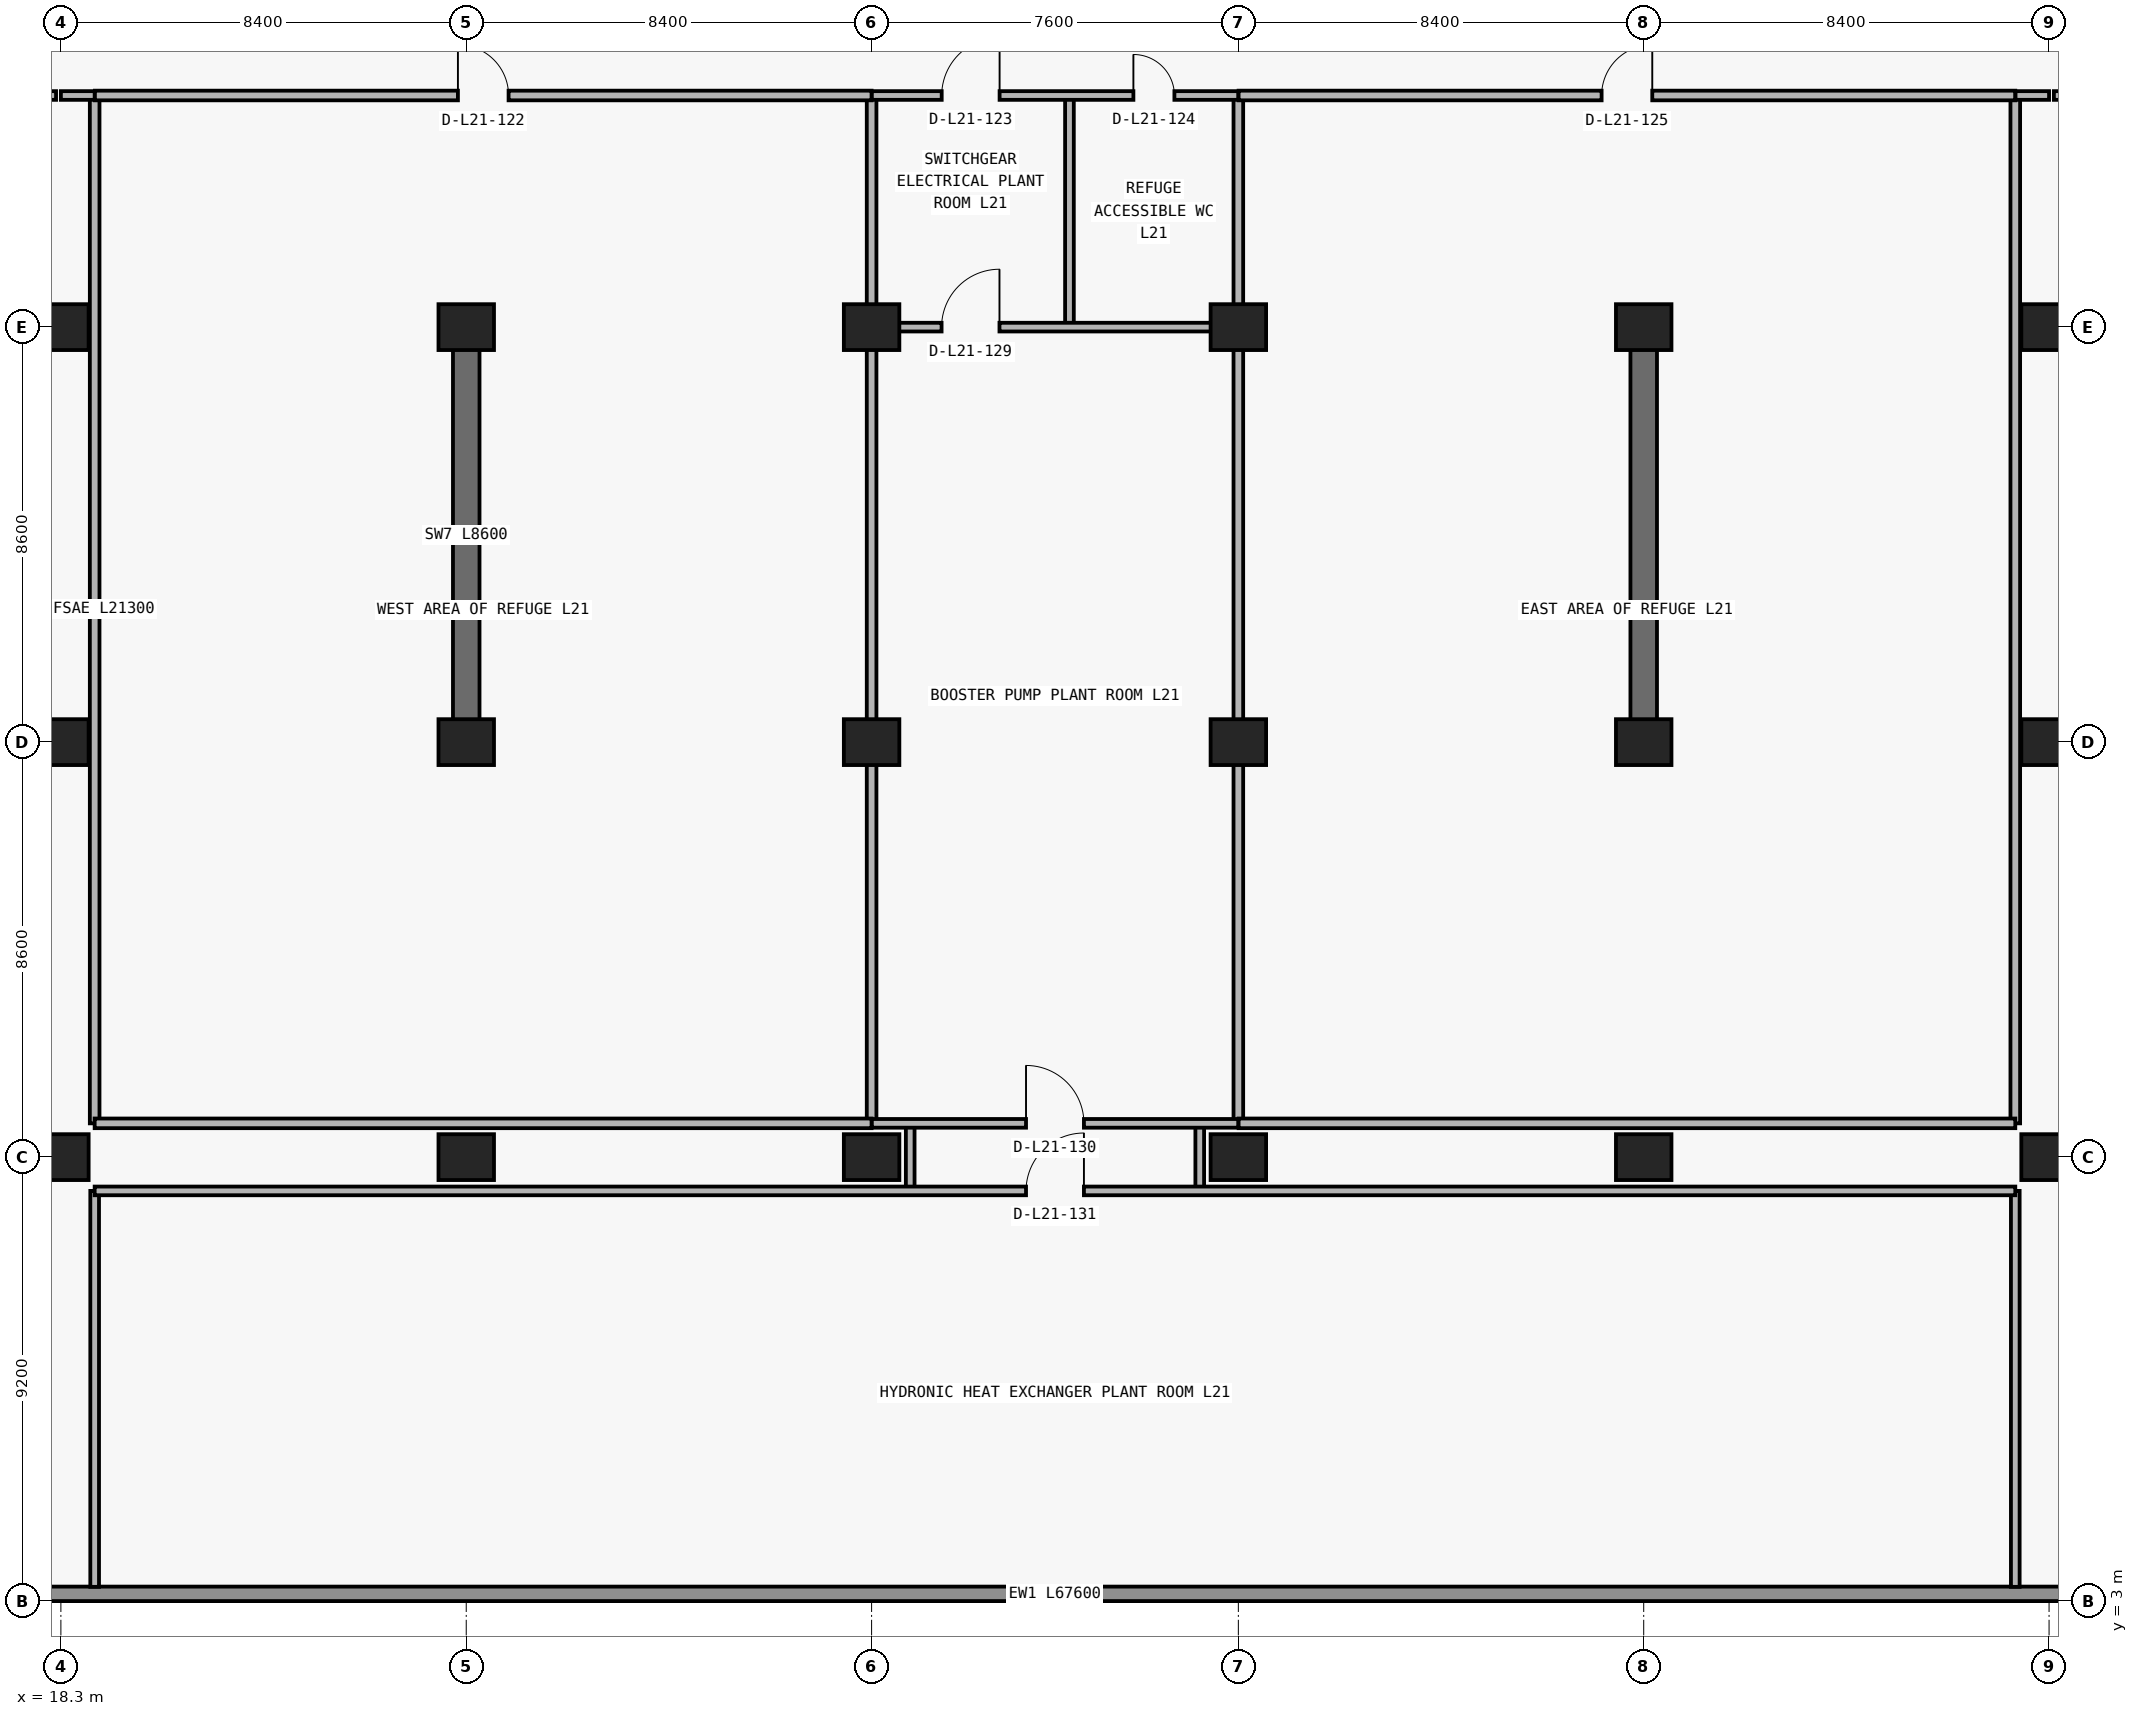
"""IFC4 building model, lengths in metres.
Left out: names, types, materials, properties, quantities, classifications, styles, units other than length and angle.
Written with IfcOpenShell. Run it as: python <this file> out.ifc"""

import sys

from ifc_helpers import new_model, si_unit, direction, frame, frame_2d, origin, origin_2d, place, context, subcontext, project, spatial, rectangle, extrude, element, fill, save


model = new_model("IFC4")
c1 = context("Model", 3, precision=1e-05, world=origin(), true_north=direction((0.0, 1.0)))
c2 = subcontext(c1, "Body", "Model", "MODEL_VIEW")
j1 = project(units=[si_unit("LENGTHUNIT", "METRE"), si_unit("PLANEANGLEUNIT", "RADIAN")], contexts=[c1])
p1 = place(None, origin())
s1 = spatial("IfcSite", under=j1, at=p1, CompositionType="ELEMENT")
p2 = place(p1, origin())
s2 = spatial("IfcBuilding", under=s1, at=p2, CompositionType="ELEMENT")
p3 = place(p2, frame((0.0, 0.0, 79.5)))
s3 = spatial("IfcBuildingStorey", under=s2, at=p3, CompositionType="ELEMENT", Elevation=79.5)
for number, where, z_axis, x_axis in (
    (1, (18.3, 12.2, 0.0), (0.0, 0.0, 1.0), (1.0, 0.0, 0.0)),
    (2, (26.7, 12.2, 0.0), (0.0, 0.0, 1.0), (1.0, 0.0, 0.0)),
    (3, (35.1, 12.2, 0.0), (0.0, 0.0, 1.0), (1.0, 0.0, 0.0)),
    (4, (42.7, 12.2, 0.0), (0.0, 0.0, 1.0), (1.0, 0.0, 0.0)),
    (5, (51.1, 12.2, 0.0), (0.0, 0.0, 1.0), (1.0, 0.0, 0.0)),
    (6, (59.5, 12.2, 0.0), (0.0, 0.0, 1.0), (1.0, 0.0, 0.0)),
    (7, (18.3, 20.8, 0.0), (0.0, 0.0, 1.0), (1.0, 0.0, 0.0)),
    (8, (26.7, 20.8, 0.0), (0.0, 0.0, 1.0), (1.0, 0.0, 0.0)),
    (9, (35.1, 20.8, 0.0), (0.0, 0.0, 1.0), (1.0, 0.0, 0.0)),
    (10, (42.7, 20.8, 0.0), (0.0, 0.0, 1.0), (1.0, 0.0, 0.0)),
    (11, (51.1, 20.8, 0.0), (0.0, 0.0, 1.0), (1.0, 0.0, 0.0)),
    (12, (59.5, 20.8, 0.0), (0.0, 0.0, 1.0), (1.0, 0.0, 0.0)),
    (13, (18.3, 29.4, 0.0), (0.0, 0.0, 1.0), (1.0, 0.0, 0.0)),
    (14, (26.7, 29.4, 0.0), (0.0, 0.0, 1.0), (1.0, 0.0, 0.0)),
    (15, (35.1, 29.4, 0.0), (0.0, 0.0, 1.0), (1.0, 0.0, 0.0)),
    (16, (42.7, 29.4, 0.0), (0.0, 0.0, 1.0), (1.0, 0.0, 0.0)),
    (17, (51.1, 29.4, 0.0), (0.0, 0.0, 1.0), (1.0, 0.0, 0.0)),
    (18, (59.5, 29.4, 0.0), (0.0, 0.0, 1.0), (1.0, 0.0, 0.0)),
):
    element("IfcColumn", number, at=place(p3, frame(where, z_axis=z_axis, x_axis=x_axis)), inside=s3, PredefinedType="COLUMN", context=c2, shape_type="SweptSolid", body=[
        extrude(rectangle(XDim=1.15, YDim=0.95, at=origin_2d()), origin(), (0.0, 0.0, 1.0), 4.85),
    ])
for number, where, z_axis, x_axis in (
    (19, (26.7, 20.8, 0.0), (0.0, 0.0, 1.0), (0.0, 1.0, 0.0)),
    (20, (51.1, 20.8, 0.0), (0.0, 0.0, 1.0), (0.0, 1.0, 0.0)),
):
    element("IfcWall", number, at=place(p3, frame(where, z_axis=z_axis, x_axis=x_axis)), inside=s3, PredefinedType="SHEAR", context=c2, shape_type="SweptSolid", body=[
        extrude(rectangle(XDim=8.6, YDim=0.55, at=frame_2d((4.3, 0.0))), origin(), (0.0, 0.0, 1.0), 4.85),
    ])
p4 = place(p3, frame((72.7, 3.15, 0.0), z_axis=(0.0, 0.0, 1.0), x_axis=(-1.0, 0.0, 0.0)))
e21 = element("IfcWall", 21, at=p4, inside=s3, PredefinedType="STANDARD", context=c2, shape_type="SweptSolid", body=[
    extrude(rectangle(XDim=67.6, YDim=0.3, at=frame_2d((33.8, 0.0))), origin(), (0.0, 0.0, 1.0), 4.85),
])
p5 = place(p3, frame((19.0, 3.295, 0.0), z_axis=(0.0, 0.0, 1.0), x_axis=(0.0, 1.0, 0.0)))
e22 = element("IfcWall", 22, at=p5, inside=s3, PredefinedType="PARTITIONING", context=c2, shape_type="SweptSolid", body=[
    extrude(rectangle(XDim=8.205, YDim=0.18, at=frame_2d((4.103, 0.0))), origin(), (0.0, 0.0, 1.0), 4.85),
])
p6 = place(p3, frame((19.0, 12.9, 0.0), z_axis=(0.0, 0.0, 1.0), x_axis=(0.0, 1.0, 0.0)))
e23 = element("IfcWall", 23, at=p6, inside=s3, PredefinedType="PARTITIONING", context=c2, shape_type="SweptSolid", body=[
    extrude(rectangle(XDim=21.3, YDim=0.2, at=frame_2d((10.65, 0.0))), origin(), (0.0, 0.0, 1.0), 4.85),
])
p7 = place(p3, frame((35.1, 12.9, 0.0), z_axis=(0.0, 0.0, 1.0), x_axis=(0.0, 1.0, 0.0)))
e24 = element("IfcWall", 24, at=p7, inside=s3, PredefinedType="PARTITIONING", context=c2, shape_type="SweptSolid", body=[
    extrude(rectangle(XDim=21.3, YDim=0.2, at=frame_2d((10.65, 0.0))), origin(), (0.0, 0.0, 1.0), 3.814),
])
p8 = place(p3, frame((35.9, 11.5, 0.0), z_axis=(0.0, 0.0, 1.0), x_axis=(0.0, 1.0, 0.0)))
e25 = element("IfcWall", 25, at=p8, inside=s3, PredefinedType="PARTITIONING", context=c2, shape_type="SweptSolid", body=[
    extrude(rectangle(XDim=1.4, YDim=0.18, at=frame_2d((0.7, 0.0))), origin(), (0.0, 0.0, 1.0), 4.85),
])
p9 = place(p3, frame((39.2, 29.4, 0.0), z_axis=(0.0, 0.0, 1.0), x_axis=(0.0, 1.0, 0.0)))
e26 = element("IfcWall", 26, at=p9, inside=s3, PredefinedType="PARTITIONING", context=c2, shape_type="SweptSolid", body=[
    extrude(rectangle(XDim=4.8, YDim=0.18, at=frame_2d((2.4, 0.0))), origin(), (0.0, 0.0, 1.0), 4.85),
])
p10 = place(p3, frame((41.9, 11.5, 0.0), z_axis=(0.0, 0.0, 1.0), x_axis=(0.0, 1.0, 0.0)))
e27 = element("IfcWall", 27, at=p10, inside=s3, PredefinedType="PARTITIONING", context=c2, shape_type="SweptSolid", body=[
    extrude(rectangle(XDim=1.4, YDim=0.18, at=frame_2d((0.7, 0.0))), origin(), (0.0, 0.0, 1.0), 4.85),
])
p11 = place(p3, frame((42.7, 12.9, 0.0), z_axis=(0.0, 0.0, 1.0), x_axis=(0.0, 1.0, 0.0)))
e28 = element("IfcWall", 28, at=p11, inside=s3, PredefinedType="PARTITIONING", context=c2, shape_type="SweptSolid", body=[
    extrude(rectangle(XDim=21.3, YDim=0.2, at=frame_2d((10.65, 0.0))), origin(), (0.0, 0.0, 1.0), 3.814),
])
p12 = place(p3, frame((58.8, 3.295, 0.0), z_axis=(0.0, 0.0, 1.0), x_axis=(0.0, 1.0, 0.0)))
e29 = element("IfcWall", 29, at=p12, inside=s3, PredefinedType="PARTITIONING", context=c2, shape_type="SweptSolid", body=[
    extrude(rectangle(XDim=8.205, YDim=0.18, at=frame_2d((4.103, 0.0))), origin(), (0.0, 0.0, 1.0), 4.85),
])
p13 = place(p3, frame((58.8, 12.9, 0.0), z_axis=(0.0, 0.0, 1.0), x_axis=(0.0, 1.0, 0.0)))
e30 = element("IfcWall", 30, at=p13, inside=s3, PredefinedType="PARTITIONING", context=c2, shape_type="SweptSolid", body=[
    extrude(rectangle(XDim=21.3, YDim=0.2, at=frame_2d((10.65, 0.0))), origin(), (0.0, 0.0, 1.0), 4.85),
])
p14 = place(p3, frame((19.0, 11.5, 0.0), z_axis=(0.0, 0.0, 1.0), x_axis=(1.0, 0.0, 0.0)))
e31 = element("IfcWall", 31, at=p14, inside=s3, PredefinedType="PARTITIONING", context=c2, shape_type="SweptSolid", body=[
    extrude(rectangle(XDim=39.8, YDim=0.18, at=frame_2d((19.9, 0.0))), origin(), (0.0, 0.0, 1.0), 4.85),
])
p15 = place(p14, frame((19.3, 0.0, 0.0)))
e32 = element("IfcOpeningElement", 32, at=p15, cuts=e31, PredefinedType="OPENING", context=c2, shape_type="SweptSolid", body=[
    extrude(rectangle(XDim=1.2, YDim=2.2, at=frame_2d((0.6, 1.1))), frame((0.0, 0.1, 0.0), z_axis=(0.0, -1.0, 0.0), x_axis=(1.0, 0.0, 0.0)), (0.0, 0.0, 1.0), 0.2),
])
p16 = place(p3, frame((19.0, 12.9, 0.0), z_axis=(0.0, 0.0, 1.0), x_axis=(1.0, 0.0, 0.0)))
e33 = element("IfcWall", 33, at=p16, inside=s3, PredefinedType="PARTITIONING", context=c2, shape_type="SweptSolid", body=[
    extrude(rectangle(XDim=16.1, YDim=0.2, at=frame_2d((8.05, 0.0))), origin(), (0.0, 0.0, 1.0), 4.85),
])
p17 = place(p3, frame((35.105, 12.9, 0.0), z_axis=(0.0, 0.0, 1.0), x_axis=(1.0, 0.0, 0.0)))
e34 = element("IfcWall", 34, at=p17, inside=s3, PredefinedType="PARTITIONING", context=c2, shape_type="SweptSolid", body=[
    extrude(rectangle(XDim=7.595, YDim=0.18, at=frame_2d((3.797, 0.0))), origin(), (0.0, 0.0, 1.0), 4.85),
])
p18 = place(p17, frame((3.195, 0.0, 0.0)))
e35 = element("IfcOpeningElement", 35, at=p18, cuts=e34, PredefinedType="OPENING", context=c2, shape_type="SweptSolid", body=[
    extrude(rectangle(XDim=1.2, YDim=2.2, at=frame_2d((0.6, 1.1))), frame((0.0, 0.1, 0.0), z_axis=(0.0, -1.0, 0.0), x_axis=(1.0, 0.0, 0.0)), (0.0, 0.0, 1.0), 0.2),
])
p19 = place(p3, frame((42.705, 12.9, 0.0), z_axis=(0.0, 0.0, 1.0), x_axis=(1.0, 0.0, 0.0)))
e36 = element("IfcWall", 36, at=p19, inside=s3, PredefinedType="PARTITIONING", context=c2, shape_type="SweptSolid", body=[
    extrude(rectangle(XDim=16.095, YDim=0.2, at=frame_2d((8.047, 0.0))), origin(), (0.0, 0.0, 1.0), 4.85),
])
p20 = place(p3, frame((35.1, 29.4, 0.0), z_axis=(0.0, 0.0, 1.0), x_axis=(1.0, 0.0, 0.0)))
e37 = element("IfcWall", 37, at=p20, inside=s3, PredefinedType="PARTITIONING", context=c2, shape_type="SweptSolid", body=[
    extrude(rectangle(XDim=7.6, YDim=0.18, at=frame_2d((3.8, 0.0))), origin(), (0.0, 0.0, 1.0), 3.814),
])
p21 = place(p20, frame((1.45, 0.0, 0.0)))
e38 = element("IfcOpeningElement", 38, at=p21, cuts=e37, PredefinedType="OPENING", context=c2, shape_type="SweptSolid", body=[
    extrude(rectangle(XDim=1.2, YDim=2.2, at=frame_2d((0.6, 1.1))), frame((0.0, 0.1, 0.0), z_axis=(0.0, -1.0, 0.0), x_axis=(1.0, 0.0, 0.0)), (0.0, 0.0, 1.0), 0.2),
])
p22 = place(p3, frame((5.1, 34.2, 0.0), z_axis=(0.0, 0.0, 1.0), x_axis=(1.0, 0.0, 0.0)))
e39 = element("IfcWall", 39, at=p22, inside=s3, PredefinedType="PARTITIONING", context=c2, shape_type="SweptSolid", body=[
    extrude(rectangle(XDim=13.1, YDim=0.18, at=frame_2d((6.55, 0.0))), origin(), (0.0, 0.0, 1.0), 4.85),
])
p23 = place(p22, frame((5.65, 0.0, 0.0)))
e40 = element("IfcOpeningElement", 40, at=p23, cuts=e39, PredefinedType="OPENING", context=c2, shape_type="SweptSolid", body=[
    extrude(rectangle(XDim=1.2, YDim=2.2, at=frame_2d((0.6, 1.1))), frame((0.0, 0.1, 0.0), z_axis=(0.0, -1.0, 0.0), x_axis=(1.0, 0.0, 0.0)), (0.0, 0.0, 1.0), 0.2),
])
p24 = place(p3, frame((18.3, 34.2, 0.0), z_axis=(0.0, 0.0, 1.0), x_axis=(1.0, 0.0, 0.0)))
e41 = element("IfcWall", 41, at=p24, inside=s3, PredefinedType="PARTITIONING", context=c2, shape_type="SweptSolid", body=[
    extrude(rectangle(XDim=0.7, YDim=0.18, at=frame_2d((0.35, 0.0))), origin(), (0.0, 0.0, 1.0), 4.85),
])
p25 = place(p3, frame((19.005, 34.2, 0.0), z_axis=(0.0, 0.0, 1.0), x_axis=(1.0, 0.0, 0.0)))
e42 = element("IfcWall", 42, at=p25, inside=s3, PredefinedType="PARTITIONING", context=c2, shape_type="SweptSolid", body=[
    extrude(rectangle(XDim=16.095, YDim=0.2, at=frame_2d((8.048, 0.0))), origin(), (0.0, 0.0, 1.0), 4.85),
])
p26 = place(p25, frame((7.522, 0.0, 0.0)))
e43 = element("IfcOpeningElement", 43, at=p26, cuts=e42, PredefinedType="OPENING", context=c2, shape_type="SweptSolid", body=[
    extrude(rectangle(XDim=1.05, YDim=2.15, at=frame_2d((0.525, 1.075))), frame((0.0, 0.11, 0.0), z_axis=(0.0, -1.0, 0.0), x_axis=(1.0, 0.0, 0.0)), (0.0, 0.0, 1.0), 0.22),
])
p27 = place(p3, frame((35.105, 34.2, 0.0), z_axis=(0.0, 0.0, 1.0), x_axis=(1.0, 0.0, 0.0)))
e44 = element("IfcWall", 44, at=p27, inside=s3, PredefinedType="PARTITIONING", context=c2, shape_type="SweptSolid", body=[
    extrude(rectangle(XDim=7.595, YDim=0.18, at=frame_2d((3.797, 0.0))), origin(), (0.0, 0.0, 1.0), 4.85),
])
p28 = place(p27, frame((1.448, 0.0, 0.0)))
e45 = element("IfcOpeningElement", 45, at=p28, cuts=e44, PredefinedType="OPENING", context=c2, shape_type="SweptSolid", body=[
    extrude(rectangle(XDim=1.2, YDim=2.2, at=frame_2d((0.6, 1.1))), frame((0.0, 0.1, 0.0), z_axis=(0.0, -1.0, 0.0), x_axis=(1.0, 0.0, 0.0)), (0.0, 0.0, 1.0), 0.2),
])
p29 = place(p27, frame((5.42, 0.0, 0.0)))
e46 = element("IfcOpeningElement", 46, at=p29, cuts=e44, PredefinedType="OPENING", context=c2, shape_type="SweptSolid", body=[
    extrude(rectangle(XDim=0.85, YDim=2.1, at=frame_2d((0.425, 1.05))), frame((0.0, 0.1, 0.0), z_axis=(0.0, -1.0, 0.0), x_axis=(1.0, 0.0, 0.0)), (0.0, 0.0, 1.0), 0.2),
])
p30 = place(p3, frame((42.705, 34.2, 0.0), z_axis=(0.0, 0.0, 1.0), x_axis=(1.0, 0.0, 0.0)))
e47 = element("IfcWall", 47, at=p30, inside=s3, PredefinedType="PARTITIONING", context=c2, shape_type="SweptSolid", body=[
    extrude(rectangle(XDim=16.095, YDim=0.2, at=frame_2d((8.047, 0.0))), origin(), (0.0, 0.0, 1.0), 4.85),
])
p31 = place(p30, frame((7.522, 0.0, 0.0)))
e48 = element("IfcOpeningElement", 48, at=p31, cuts=e47, PredefinedType="OPENING", context=c2, shape_type="SweptSolid", body=[
    extrude(rectangle(XDim=1.05, YDim=2.15, at=frame_2d((0.525, 1.075))), frame((0.0, 0.11, 0.0), z_axis=(0.0, -1.0, 0.0), x_axis=(1.0, 0.0, 0.0)), (0.0, 0.0, 1.0), 0.22),
])
p32 = place(p3, frame((58.805, 34.2, 0.0), z_axis=(0.0, 0.0, 1.0), x_axis=(1.0, 0.0, 0.0)))
e49 = element("IfcWall", 49, at=p32, inside=s3, PredefinedType="PARTITIONING", context=c2, shape_type="SweptSolid", body=[
    extrude(rectangle(XDim=0.695, YDim=0.18, at=frame_2d((0.348, 0.0))), origin(), (0.0, 0.0, 1.0), 4.85),
])
p33 = place(p3, frame((59.6, 34.2, 0.0), z_axis=(0.0, 0.0, 1.0), x_axis=(1.0, 0.0, 0.0)))
e50 = element("IfcWall", 50, at=p33, inside=s3, PredefinedType="PARTITIONING", context=c2, shape_type="SweptSolid", body=[
    extrude(rectangle(XDim=13.1, YDim=0.18, at=frame_2d((6.55, 0.0))), origin(), (0.0, 0.0, 1.0), 4.85),
])
p34 = place(p33, frame((6.25, 0.0, 0.0)))
e51 = element("IfcOpeningElement", 51, at=p34, cuts=e50, PredefinedType="OPENING", context=c2, shape_type="SweptSolid", body=[
    extrude(rectangle(XDim=1.2, YDim=2.2, at=frame_2d((0.6, 1.1))), frame((0.0, 0.1, 0.0), z_axis=(0.0, -1.0, 0.0), x_axis=(1.0, 0.0, 0.0)), (0.0, 0.0, 1.0), 0.2),
])
p35 = place(p26, origin())
e52 = element("IfcDoor", 52, at=p35, inside=s3, OperationType="SINGLE_SWING_LEFT", PredefinedType="DOOR", context=c2, shape_type="SweptSolid", body=[
    extrude(rectangle(XDim=1.05, YDim=2.15, at=frame_2d((0.525, 1.075))), frame((0.0, 0.025, 0.0), z_axis=(0.0, -1.0, 0.0), x_axis=(1.0, 0.0, 0.0)), (0.0, 0.0, 1.0), 0.05),
])
fill(e43, e52)
p36 = place(p28, origin())
e53 = element("IfcDoor", 53, at=p36, inside=s3, OperationType="SINGLE_SWING_RIGHT", PredefinedType="DOOR", context=c2, shape_type="SweptSolid", body=[
    extrude(rectangle(XDim=1.2, YDim=2.2, at=frame_2d((0.6, 1.1))), frame((0.0, 0.025, 0.0), z_axis=(0.0, -1.0, 0.0), x_axis=(1.0, 0.0, 0.0)), (0.0, 0.0, 1.0), 0.05),
])
fill(e45, e53)
p37 = place(p29, origin())
e54 = element("IfcDoor", 54, at=p37, inside=s3, OperationType="SINGLE_SWING_LEFT", PredefinedType="DOOR", context=c2, shape_type="SweptSolid", body=[
    extrude(rectangle(XDim=0.85, YDim=2.1, at=frame_2d((0.425, 1.05))), frame((0.0, 0.025, 0.0), z_axis=(0.0, -1.0, 0.0), x_axis=(1.0, 0.0, 0.0)), (0.0, 0.0, 1.0), 0.05),
])
fill(e46, e54)
p38 = place(p31, origin())
e55 = element("IfcDoor", 55, at=p38, inside=s3, OperationType="SINGLE_SWING_RIGHT", PredefinedType="DOOR", context=c2, shape_type="SweptSolid", body=[
    extrude(rectangle(XDim=1.05, YDim=2.15, at=frame_2d((0.525, 1.075))), frame((0.0, 0.025, 0.0), z_axis=(0.0, -1.0, 0.0), x_axis=(1.0, 0.0, 0.0)), (0.0, 0.0, 1.0), 0.05),
])
fill(e48, e55)
p39 = place(p21, origin())
e56 = element("IfcDoor", 56, at=p39, inside=s3, OperationType="SINGLE_SWING_RIGHT", PredefinedType="DOOR", context=c2, shape_type="SweptSolid", body=[
    extrude(rectangle(XDim=1.2, YDim=2.2, at=frame_2d((0.6, 1.1))), frame((0.0, 0.025, 0.0), z_axis=(0.0, -1.0, 0.0), x_axis=(1.0, 0.0, 0.0)), (0.0, 0.0, 1.0), 0.05),
])
fill(e38, e56)
p40 = place(p18, origin())
e57 = element("IfcDoor", 57, at=p40, inside=s3, OperationType="SINGLE_SWING_LEFT", PredefinedType="DOOR", context=c2, shape_type="SweptSolid", body=[
    extrude(rectangle(XDim=1.2, YDim=2.2, at=frame_2d((0.6, 1.1))), frame((0.0, 0.025, 0.0), z_axis=(0.0, -1.0, 0.0), x_axis=(1.0, 0.0, 0.0)), (0.0, 0.0, 1.0), 0.05),
])
fill(e35, e57)
p41 = place(p15, origin())
e58 = element("IfcDoor", 58, at=p41, inside=s3, OperationType="SINGLE_SWING_RIGHT", PredefinedType="DOOR", context=c2, shape_type="SweptSolid", body=[
    extrude(rectangle(XDim=1.2, YDim=2.2, at=frame_2d((0.6, 1.1))), frame((0.0, 0.025, 0.0), z_axis=(0.0, -1.0, 0.0), x_axis=(1.0, 0.0, 0.0)), (0.0, 0.0, 1.0), 0.05),
])
fill(e32, e58)
save(model, sys.argv[1])
